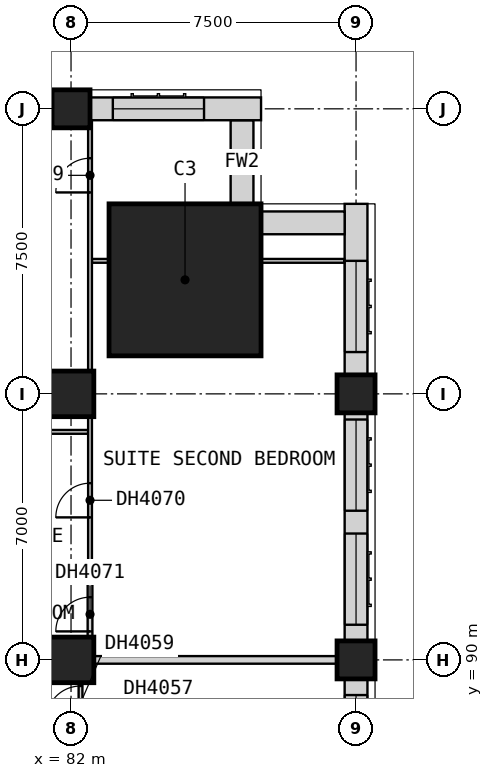
"""IFC4 building model, lengths in metres.
Left out: names, types, materials, properties, quantities, classifications, styles, units other than length and angle.
Written with IfcOpenShell. Run it as: python <this file> out.ifc"""

import sys

from ifc_helpers import new_model, si_unit, direction, frame, frame_2d, origin, origin_2d, place, context, subcontext, project, spatial, rectangle, extrude, element, fill, save


model = new_model("IFC4")
c1 = context("Model", 3, precision=1e-05, world=origin(), true_north=direction((0.0, 1.0)))
c2 = subcontext(c1, "Body", "Model", "MODEL_VIEW")
j1 = project(units=[si_unit("LENGTHUNIT", "METRE"), si_unit("PLANEANGLEUNIT", "RADIAN")], contexts=[c1])
p1 = place(None, origin())
s1 = spatial("IfcSite", under=j1, at=p1, CompositionType="ELEMENT")
p2 = place(p1, origin())
s2 = spatial("IfcBuilding", under=s1, at=p2, CompositionType="ELEMENT")
p3 = place(p2, frame((0.0, 0.0, 44.8)))
s3 = spatial("IfcBuildingStorey", under=s2, at=p3, CompositionType="ELEMENT", Elevation=44.8)
for number, where, z_axis, x_axis in (
    (1, (82.0, 90.0, 0.0), (0.0, 0.0, 1.0), (1.0, 0.0, 0.0)),
    (2, (82.0, 97.0, 0.0), (0.0, 0.0, 1.0), (1.0, 0.0, 0.0)),
):
    element("IfcColumn", number, at=place(p3, frame(where, z_axis=z_axis, x_axis=x_axis)), inside=s3, PredefinedType="COLUMN", context=c2, shape_type="SweptSolid", body=[
        extrude(rectangle(XDim=1.2, YDim=1.2, at=origin_2d()), origin(), (0.0, 0.0, 1.0), 3.6),
    ])
for number, where, z_axis, x_axis in (
    (3, (82.0, 104.5, 0.0), (0.0, 0.0, 1.0), (1.0, 0.0, 0.0)),
    (4, (89.5, 90.0, 0.0), (0.0, 0.0, 1.0), (1.0, 0.0, 0.0)),
    (5, (89.5, 97.0, 0.0), (0.0, 0.0, 1.0), (1.0, 0.0, 0.0)),
):
    element("IfcColumn", number, at=place(p3, frame(where, z_axis=z_axis, x_axis=x_axis)), inside=s3, PredefinedType="COLUMN", context=c2, shape_type="SweptSolid", body=[
        extrude(rectangle(XDim=1.0, YDim=1.0, at=origin_2d()), origin(), (0.0, 0.0, 1.0), 3.6),
    ])
p4 = place(p3, frame((85.0, 100.0, 0.0), z_axis=(0.0, 0.0, 1.0), x_axis=(1.0, 0.0, 0.0)))
e6 = element("IfcColumn", 6, at=p4, inside=s3, PredefinedType="COLUMN", context=c2, shape_type="SweptSolid", body=[
    extrude(rectangle(XDim=4.0, YDim=4.0, at=origin_2d()), origin(), (0.0, 0.0, 1.0), 3.6),
])
p5 = place(p3, frame((89.5, 83.0, 0.0), z_axis=(0.0, 0.0, 1.0), x_axis=(0.0, 1.0, 0.0)))
e7 = element("IfcWall", 7, at=p5, inside=s3, PredefinedType="SOLIDWALL", context=c2, shape_type="SweptSolid", body=[
    extrude(rectangle(XDim=6.5, YDim=0.6, at=frame_2d((3.25, 0.0))), origin(), (0.0, 0.0, 1.0), 2.85),
])
p6 = place(p5, frame((0.425, 0.0, 0.8)))
e8 = element("IfcOpeningElement", 8, at=p6, cuts=e7, PredefinedType="OPENING", context=c2, shape_type="SweptSolid", body=[
    extrude(rectangle(XDim=2.4, YDim=1.8, at=frame_2d((1.2, 0.9))), frame((0.0, 0.31, 0.0), z_axis=(0.0, -1.0, 0.0), x_axis=(1.0, 0.0, 0.0)), (0.0, 0.0, 1.0), 0.62),
])
p7 = place(p5, frame((3.675, 0.0, 0.8)))
e9 = element("IfcOpeningElement", 9, at=p7, cuts=e7, PredefinedType="OPENING", context=c2, shape_type="SweptSolid", body=[
    extrude(rectangle(XDim=2.4, YDim=1.8, at=frame_2d((1.2, 0.9))), frame((0.0, 0.31, 0.0), z_axis=(0.0, -1.0, 0.0), x_axis=(1.0, 0.0, 0.0)), (0.0, 0.0, 1.0), 0.62),
])
p8 = place(p3, frame((89.5, 90.5, 0.0), z_axis=(0.0, 0.0, 1.0), x_axis=(0.0, 1.0, 0.0)))
e10 = element("IfcWall", 10, at=p8, inside=s3, PredefinedType="SOLIDWALL", context=c2, shape_type="SweptSolid", body=[
    extrude(rectangle(XDim=6.0, YDim=0.6, at=frame_2d((3.0, 0.0))), origin(), (0.0, 0.0, 1.0), 2.85),
])
p9 = place(p8, frame((0.425, 0.0, 0.8)))
e11 = element("IfcOpeningElement", 11, at=p9, cuts=e10, PredefinedType="OPENING", context=c2, shape_type="SweptSolid", body=[
    extrude(rectangle(XDim=2.4, YDim=1.8, at=frame_2d((1.2, 0.9))), frame((0.0, 0.31, 0.0), z_axis=(0.0, -1.0, 0.0), x_axis=(1.0, 0.0, 0.0)), (0.0, 0.0, 1.0), 0.62),
])
p10 = place(p8, frame((3.425, 0.0, 0.8)))
e12 = element("IfcOpeningElement", 12, at=p10, cuts=e10, PredefinedType="OPENING", context=c2, shape_type="SweptSolid", body=[
    extrude(rectangle(XDim=2.4, YDim=1.8, at=frame_2d((1.2, 0.9))), frame((0.0, 0.31, 0.0), z_axis=(0.0, -1.0, 0.0), x_axis=(1.0, 0.0, 0.0)), (0.0, 0.0, 1.0), 0.62),
])
p11 = place(p3, frame((89.5, 97.5, 0.0), z_axis=(0.0, 0.0, 1.0), x_axis=(0.0, 1.0, 0.0)))
e13 = element("IfcWall", 13, at=p11, inside=s3, PredefinedType="SOLIDWALL", context=c2, shape_type="SweptSolid", body=[
    extrude(rectangle(XDim=4.5, YDim=0.6, at=frame_2d((2.25, 0.0))), origin(), (0.0, 0.0, 1.0), 3.35),
])
p12 = place(p11, frame((0.6, 0.0, 0.8)))
e14 = element("IfcOpeningElement", 14, at=p12, cuts=e13, PredefinedType="OPENING", context=c2, shape_type="SweptSolid", body=[
    extrude(rectangle(XDim=2.4, YDim=1.8, at=frame_2d((1.2, 0.9))), frame((0.0, 0.31, 0.0), z_axis=(0.0, -1.0, 0.0), x_axis=(1.0, 0.0, 0.0)), (0.0, 0.0, 1.0), 0.62),
])
for number, where, z_axis, x_axis in (
    (15, (89.2, 101.5, 0.0), (0.0, 0.0, 1.0), (-1.0, 0.0, 0.0)),
    (16, (86.5, 102.0, 0.0), (0.0, 0.0, 1.0), (0.0, 1.0, 0.0)),
):
    element("IfcWall", number, at=place(p3, frame(where, z_axis=z_axis, x_axis=x_axis)), inside=s3, PredefinedType="SOLIDWALL", context=c2, shape_type="SweptSolid", body=[
        extrude(rectangle(XDim=2.2, YDim=0.6, at=frame_2d((1.1, 0.0))), origin(), (0.0, 0.0, 1.0), 3.35),
    ])
p13 = place(p3, frame((87.0, 104.5, 0.0), z_axis=(0.0, 0.0, 1.0), x_axis=(-1.0, 0.0, 0.0)))
e17 = element("IfcWall", 17, at=p13, inside=s3, PredefinedType="SOLIDWALL", context=c2, shape_type="SweptSolid", body=[
    extrude(rectangle(XDim=4.5, YDim=0.6, at=frame_2d((2.25, 0.0))), origin(), (0.0, 0.0, 1.0), 3.35),
])
p14 = place(p13, frame((1.5, 0.0, 0.8)))
e18 = element("IfcOpeningElement", 18, at=p14, cuts=e17, PredefinedType="OPENING", context=c2, shape_type="SweptSolid", body=[
    extrude(rectangle(XDim=2.4, YDim=1.8, at=frame_2d((1.2, 0.9))), frame((0.0, 0.31, 0.0), z_axis=(0.0, -1.0, 0.0), x_axis=(1.0, 0.0, 0.0)), (0.0, 0.0, 1.0), 0.62),
])
p15 = place(p3, frame((77.475, 90.0, 0.0), z_axis=(0.0, 0.0, 1.0), x_axis=(1.0, 0.0, 0.0)))
e19 = element("IfcWall", 19, at=p15, inside=s3, PredefinedType="PARTITIONING", context=c2, shape_type="SweptSolid", body=[
    extrude(rectangle(XDim=12.525, YDim=0.2, at=frame_2d((6.262, 0.0))), origin(), (0.0, 0.0, 1.0), 3.35),
])
p16 = place(p3, frame((75.1, 96.0, 0.0), z_axis=(0.0, 0.0, 1.0), x_axis=(1.0, 0.0, 0.0)))
e20 = element("IfcWall", 20, at=p16, inside=s3, PredefinedType="PARTITIONING", context=c2, shape_type="SweptSolid", body=[
    extrude(rectangle(XDim=7.35, YDim=0.1, at=frame_2d((3.675, 0.0))), origin(), (0.0, 0.0, 1.0), 3.35),
])
p17 = place(p16, frame((0.65, 0.0, 0.0)))
e21 = element("IfcOpeningElement", 21, at=p17, cuts=e20, PredefinedType="OPENING", context=c2, shape_type="SweptSolid", body=[
    extrude(rectangle(XDim=0.9, YDim=2.1, at=frame_2d((0.45, 1.05))), frame((0.0, 0.06, 0.0), z_axis=(0.0, -1.0, 0.0), x_axis=(1.0, 0.0, 0.0)), (0.0, 0.0, 1.0), 0.12),
])
p18 = place(p3, frame((82.55, 100.5, 0.0), z_axis=(0.0, 0.0, 1.0), x_axis=(1.0, 0.0, 0.0)))
e22 = element("IfcWall", 22, at=p18, inside=s3, PredefinedType="PARTITIONING", context=c2, shape_type="SweptSolid", body=[
    extrude(rectangle(XDim=6.64, YDim=0.1, at=frame_2d((3.32, 0.0))), origin(), (0.0, 0.0, 1.0), 3.35),
])
p19 = place(p3, frame((82.25, 88.188, 0.0), z_axis=(0.0, 0.0, 1.0), x_axis=(0.0, 1.0, 0.0)))
e23 = element("IfcWall", 23, at=p19, inside=s3, PredefinedType="PARTITIONING", context=c2, shape_type="SweptSolid", body=[
    extrude(rectangle(XDim=1.712, YDim=0.1, at=frame_2d((0.856, 0.0))), origin(), (0.0, 0.0, 1.0), 3.35),
])
p20 = place(p19, frame((0.225, 0.0, 0.0)))
e24 = element("IfcOpeningElement", 24, at=p20, cuts=e23, PredefinedType="OPENING", context=c2, shape_type="SweptSolid", body=[
    extrude(rectangle(XDim=0.9, YDim=2.1, at=frame_2d((0.45, 1.05))), frame((0.0, 0.06, 0.0), z_axis=(0.0, -1.0, 0.0), x_axis=(1.0, 0.0, 0.0)), (0.0, 0.0, 1.0), 0.12),
])
p21 = place(p3, frame((82.5, 92.462, 0.0), z_axis=(0.0, 0.0, 1.0), x_axis=(0.0, 1.0, 0.0)))
e25 = element("IfcWall", 25, at=p21, inside=s3, PredefinedType="PARTITIONING", context=c2, shape_type="SweptSolid", body=[
    extrude(rectangle(XDim=11.728, YDim=0.1, at=frame_2d((5.864, 0.0))), origin(), (0.0, 0.0, 1.0), 3.35),
])
p22 = place(p21, frame((9.837, 0.0, 0.0)))
e26 = element("IfcOpeningElement", 26, at=p22, cuts=e25, PredefinedType="OPENING", context=c2, shape_type="SweptSolid", body=[
    extrude(rectangle(XDim=0.9, YDim=2.1, at=frame_2d((0.45, 1.05))), frame((0.0, 0.06, 0.0), z_axis=(0.0, -1.0, 0.0), x_axis=(1.0, 0.0, 0.0)), (0.0, 0.0, 1.0), 0.12),
])
p23 = place(p21, frame((1.288, 0.0, 0.0)))
e27 = element("IfcOpeningElement", 27, at=p23, cuts=e25, PredefinedType="OPENING", context=c2, shape_type="SweptSolid", body=[
    extrude(rectangle(XDim=0.9, YDim=2.1, at=frame_2d((0.45, 1.05))), frame((0.0, 0.06, 0.0), z_axis=(0.0, -1.0, 0.0), x_axis=(1.0, 0.0, 0.0)), (0.0, 0.0, 1.0), 0.12),
])
p24 = place(p3, frame((77.475, 92.4, 0.0), z_axis=(0.0, 0.0, 1.0), x_axis=(1.0, 0.0, 0.0)))
e28 = element("IfcWall", 28, at=p24, inside=s3, PredefinedType="PARTITIONING", context=c2, shape_type="SweptSolid", body=[
    extrude(rectangle(XDim=5.025, YDim=0.125, at=frame_2d((2.512, 0.0))), origin(), (0.0, 0.0, 1.0), 3.35),
])
p25 = place(p3, frame((82.5, 90.1, 0.0), z_axis=(0.0, 0.0, 1.0), x_axis=(0.0, 1.0, 0.0)))
e29 = element("IfcWall", 29, at=p25, inside=s3, PredefinedType="PARTITIONING", context=c2, shape_type="SweptSolid", body=[
    extrude(rectangle(XDim=2.237, YDim=0.125, at=frame_2d((1.119, 0.0))), origin(), (0.0, 0.0, 1.0), 3.35),
])
p26 = place(p25, frame((0.65, 0.0, 0.0)))
e30 = element("IfcOpeningElement", 30, at=p26, cuts=e29, PredefinedType="OPENING", context=c2, shape_type="SweptSolid", body=[
    extrude(rectangle(XDim=0.9, YDim=2.1, at=frame_2d((0.45, 1.05))), frame((0.0, 0.073, 0.0), z_axis=(0.0, -1.0, 0.0), x_axis=(1.0, 0.0, 0.0)), (0.0, 0.0, 1.0), 0.145),
])
p27 = place(p7, origin())
e31 = element("IfcWindow", 31, at=p27, inside=s3, PartitioningType="SINGLE_PANEL", PredefinedType="WINDOW", context=c2, shape_type="SweptSolid", body=[
    extrude(rectangle(XDim=2.4, YDim=1.8, at=frame_2d((1.2, 0.9))), frame((0.0, -0.07, 0.0), z_axis=(0.0, -1.0, 0.0), x_axis=(1.0, 0.0, 0.0)), (0.0, 0.0, 1.0), 0.06),
])
fill(e9, e31)
p28 = place(p9, origin())
e32 = element("IfcWindow", 32, at=p28, inside=s3, PartitioningType="SINGLE_PANEL", PredefinedType="WINDOW", context=c2, shape_type="SweptSolid", body=[
    extrude(rectangle(XDim=2.4, YDim=1.8, at=frame_2d((1.2, 0.9))), frame((0.0, -0.07, 0.0), z_axis=(0.0, -1.0, 0.0), x_axis=(1.0, 0.0, 0.0)), (0.0, 0.0, 1.0), 0.06),
])
fill(e11, e32)
p29 = place(p10, origin())
e33 = element("IfcWindow", 33, at=p29, inside=s3, PartitioningType="SINGLE_PANEL", PredefinedType="WINDOW", context=c2, shape_type="SweptSolid", body=[
    extrude(rectangle(XDim=2.4, YDim=1.8, at=frame_2d((1.2, 0.9))), frame((0.0, -0.07, 0.0), z_axis=(0.0, -1.0, 0.0), x_axis=(1.0, 0.0, 0.0)), (0.0, 0.0, 1.0), 0.06),
])
fill(e12, e33)
p30 = place(p12, origin())
e34 = element("IfcWindow", 34, at=p30, inside=s3, PartitioningType="SINGLE_PANEL", PredefinedType="WINDOW", context=c2, shape_type="SweptSolid", body=[
    extrude(rectangle(XDim=2.4, YDim=1.8, at=frame_2d((1.2, 0.9))), frame((0.0, -0.07, 0.0), z_axis=(0.0, -1.0, 0.0), x_axis=(1.0, 0.0, 0.0)), (0.0, 0.0, 1.0), 0.06),
])
fill(e14, e34)
p31 = place(p14, origin())
e35 = element("IfcWindow", 35, at=p31, inside=s3, PartitioningType="SINGLE_PANEL", PredefinedType="WINDOW", context=c2, shape_type="SweptSolid", body=[
    extrude(rectangle(XDim=2.4, YDim=1.8, at=frame_2d((1.2, 0.9))), frame((0.0, -0.07, 0.0), z_axis=(0.0, -1.0, 0.0), x_axis=(1.0, 0.0, 0.0)), (0.0, 0.0, 1.0), 0.06),
])
fill(e18, e35)
p32 = place(p20, origin())
e36 = element("IfcDoor", 36, at=p32, inside=s3, OperationType="SINGLE_SWING_LEFT", PredefinedType="DOOR", context=c2, shape_type="SweptSolid", body=[
    extrude(rectangle(XDim=0.9, YDim=2.1, at=frame_2d((0.45, 1.05))), frame((0.0, 0.025, 0.0), z_axis=(0.0, -1.0, 0.0), x_axis=(1.0, 0.0, 0.0)), (0.0, 0.0, 1.0), 0.05),
])
fill(e24, e36)
p33 = place(p22, origin())
e37 = element("IfcDoor", 37, at=p33, inside=s3, OperationType="SINGLE_SWING_LEFT", PredefinedType="DOOR", context=c2, shape_type="SweptSolid", body=[
    extrude(rectangle(XDim=0.9, YDim=2.1, at=frame_2d((0.45, 1.05))), frame((0.0, 0.025, 0.0), z_axis=(0.0, -1.0, 0.0), x_axis=(1.0, 0.0, 0.0)), (0.0, 0.0, 1.0), 0.05),
])
fill(e26, e37)
p34 = place(p23, origin())
e38 = element("IfcDoor", 38, at=p34, inside=s3, OperationType="SINGLE_SWING_RIGHT", PredefinedType="DOOR", context=c2, shape_type="SweptSolid", body=[
    extrude(rectangle(XDim=0.9, YDim=2.1, at=frame_2d((0.45, 1.05))), frame((0.0, 0.025, 0.0), z_axis=(0.0, -1.0, 0.0), x_axis=(1.0, 0.0, 0.0)), (0.0, 0.0, 1.0), 0.05),
])
fill(e27, e38)
p35 = place(p26, origin())
e39 = element("IfcDoor", 39, at=p35, inside=s3, OperationType="SINGLE_SWING_LEFT", PredefinedType="DOOR", context=c2, shape_type="SweptSolid", body=[
    extrude(rectangle(XDim=0.9, YDim=2.1, at=frame_2d((0.45, 1.05))), frame((0.0, 0.025, 0.0), z_axis=(0.0, -1.0, 0.0), x_axis=(1.0, 0.0, 0.0)), (0.0, 0.0, 1.0), 0.05),
])
fill(e30, e39)
save(model, sys.argv[1])
